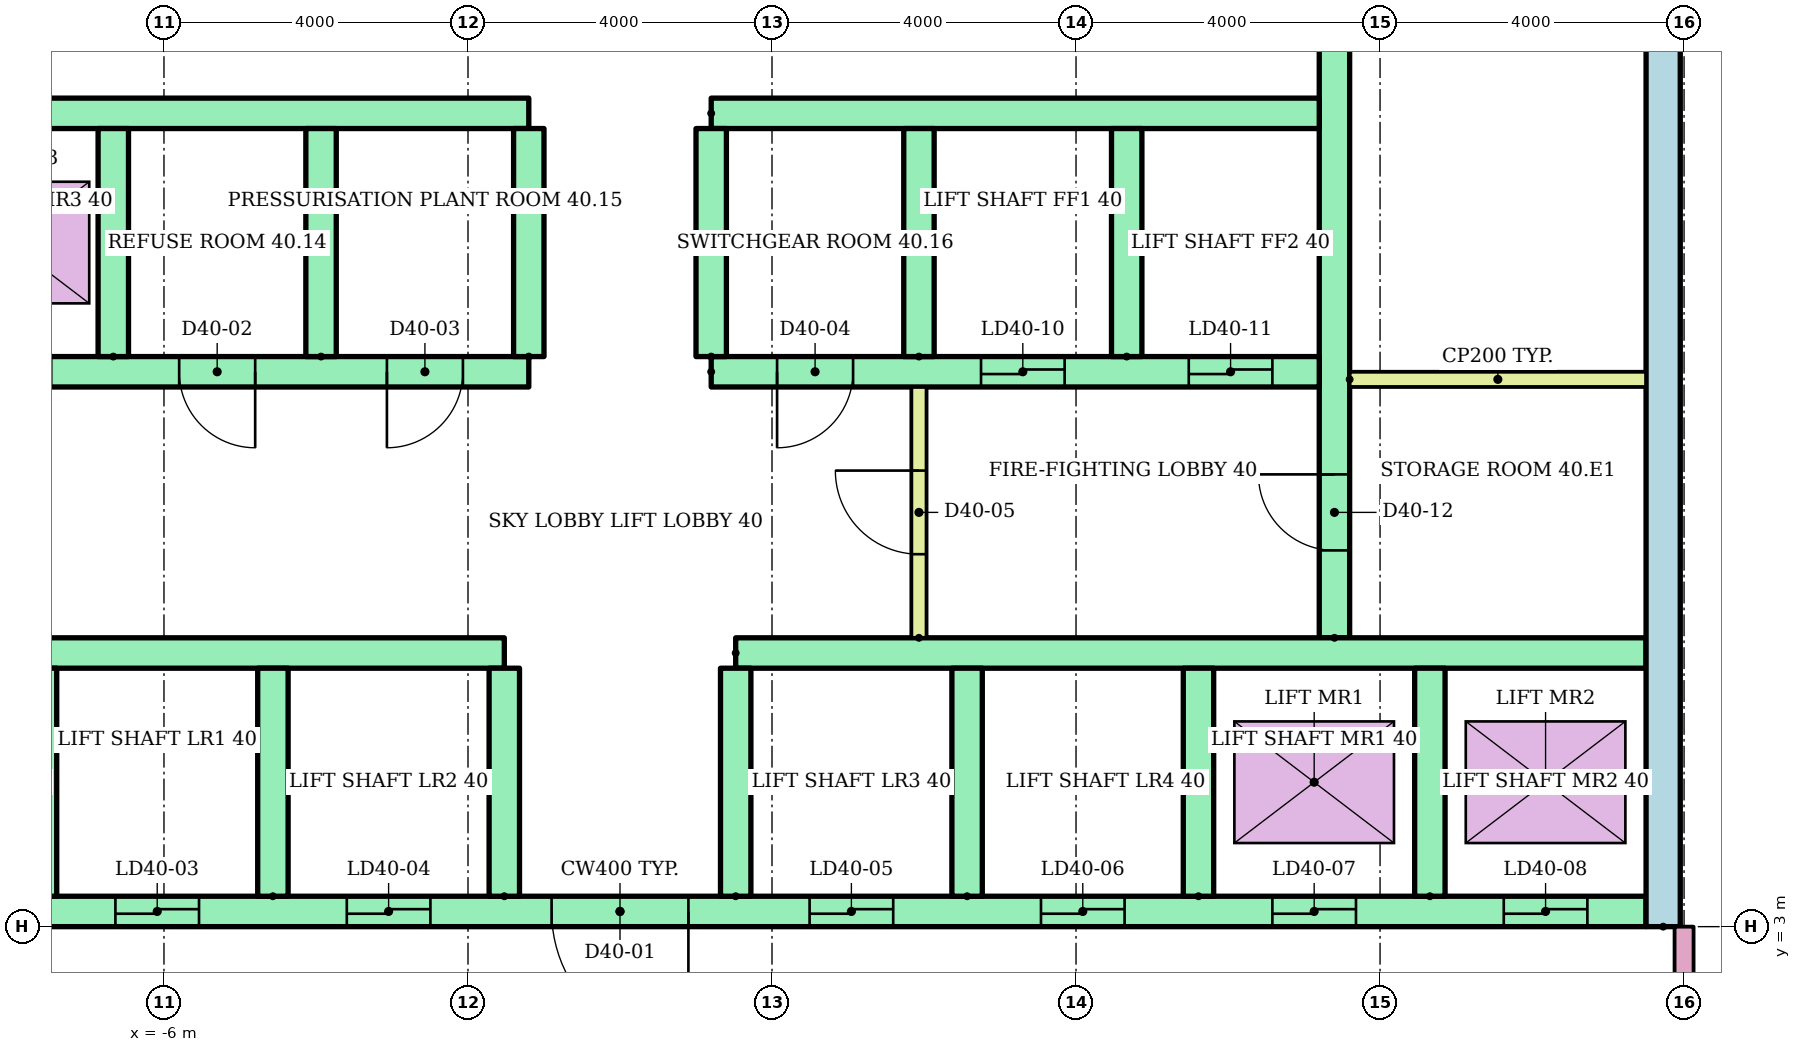
"""IFC4 building model, lengths in metres.
Left out: names, types, materials, properties, quantities, classifications, styles, units other than length and angle.
Written with IfcOpenShell. Run it as: python <this file> out.ifc"""

import sys

from ifc_helpers import new_model, si_unit, direction, frame, frame_2d, origin, place, context, subcontext, project, spatial, rectangle, extrude, element, fill, save


model = new_model("IFC4")
c1 = context("Model", 3, precision=1e-05, world=origin(), true_north=direction((0.0, 1.0)))
c2 = subcontext(c1, "Body", "Model", "MODEL_VIEW")
j1 = project(units=[si_unit("LENGTHUNIT", "METRE"), si_unit("PLANEANGLEUNIT", "RADIAN")], contexts=[c1])
p1 = place(None, origin())
s1 = spatial("IfcSite", under=j1, at=p1, CompositionType="ELEMENT")
p2 = place(p1, origin())
s2 = spatial("IfcBuilding", under=s1, at=p2, CompositionType="ELEMENT")
p3 = place(p2, frame((0.0, 0.0, 151.8)))
s3 = spatial("IfcBuildingStorey", under=s2, at=p3, CompositionType="ELEMENT", Elevation=151.8)
p4 = place(p3, frame((13.725, 3.0, 0.0), z_axis=(0.0, 0.0, 1.0), x_axis=(0.0, 1.0, 0.0)))
e1 = element("IfcWall", 1, at=p4, inside=s3, PredefinedType="SHEAR", context=c2, shape_type="SweptSolid", body=[
    extrude(rectangle(XDim=17.0, YDim=0.45, at=frame_2d((8.5, 0.0))), origin(), (0.0, 0.0, 1.0), 8.8),
])
p5 = place(p3, frame((9.4, 6.8, 0.0), z_axis=(0.0, 0.0, 1.0), x_axis=(0.0, 1.0, 0.0)))
e2 = element("IfcWall", 2, at=p5, inside=s3, PredefinedType="SHEAR", context=c2, shape_type="SweptSolid", body=[
    extrude(rectangle(XDim=12.7, YDim=0.4, at=frame_2d((6.35, 0.0))), origin(), (0.0, 0.0, 1.0), 8.8),
])
p6 = place(p5, frame((1.15, 0.0, 0.0)))
e3 = element("IfcOpeningElement", 3, at=p6, cuts=e2, PredefinedType="OPENING", context=c2, shape_type="SweptSolid", body=[
    extrude(rectangle(XDim=1.0, YDim=2.1, at=frame_2d((0.5, 1.05))), frame((0.0, 0.21, 0.0), z_axis=(0.0, -1.0, 0.0), x_axis=(1.0, 0.0, 0.0)), (0.0, 0.0, 1.0), 0.42),
])
p7 = place(p5, frame((7.925, 0.0, 0.0)))
e4 = element("IfcOpeningElement", 4, at=p7, cuts=e2, PredefinedType="OPENING", context=c2, shape_type="SweptSolid", body=[
    extrude(rectangle(XDim=1.0, YDim=2.1, at=frame_2d((0.5, 1.05))), frame((0.0, 0.21, 0.0), z_axis=(0.0, -1.0, 0.0), x_axis=(1.0, 0.0, 0.0)), (0.0, 0.0, 1.0), 0.42),
])
p8 = place(p3, frame((-13.5, 3.2, 0.0)))
e5 = element("IfcWall", 5, at=p8, inside=s3, PredefinedType="SHEAR", context=c2, shape_type="SweptSolid", body=[
    extrude(rectangle(XDim=27.0, YDim=0.4, at=frame_2d((13.5, 0.0))), origin(), (0.0, 0.0, 1.0), 8.8),
])
p9 = place(p8, frame((0.772, 0.0, 0.0)))
e6 = element("IfcOpeningElement", 6, at=p9, cuts=e5, PredefinedType="OPENING", context=c2, shape_type="SweptSolid", body=[
    extrude(rectangle(XDim=1.1, YDim=2.1, at=frame_2d((0.55, 1.05))), frame((0.0, 0.21, 0.0), z_axis=(0.0, -1.0, 0.0), x_axis=(1.0, 0.0, 0.0)), (0.0, 0.0, 1.0), 0.42),
])
p10 = place(p8, frame((3.817, 0.0, 0.0)))
e7 = element("IfcOpeningElement", 7, at=p10, cuts=e5, PredefinedType="OPENING", context=c2, shape_type="SweptSolid", body=[
    extrude(rectangle(XDim=1.1, YDim=2.1, at=frame_2d((0.55, 1.05))), frame((0.0, 0.21, 0.0), z_axis=(0.0, -1.0, 0.0), x_axis=(1.0, 0.0, 0.0)), (0.0, 0.0, 1.0), 0.42),
])
p11 = place(p8, frame((6.861, 0.0, 0.0)))
e8 = element("IfcOpeningElement", 8, at=p11, cuts=e5, PredefinedType="OPENING", context=c2, shape_type="SweptSolid", body=[
    extrude(rectangle(XDim=1.1, YDim=2.1, at=frame_2d((0.55, 1.05))), frame((0.0, 0.21, 0.0), z_axis=(0.0, -1.0, 0.0), x_axis=(1.0, 0.0, 0.0)), (0.0, 0.0, 1.0), 0.42),
])
p12 = place(p8, frame((9.906, 0.0, 0.0)))
e9 = element("IfcOpeningElement", 9, at=p12, cuts=e5, PredefinedType="OPENING", context=c2, shape_type="SweptSolid", body=[
    extrude(rectangle(XDim=1.1, YDim=2.1, at=frame_2d((0.55, 1.05))), frame((0.0, 0.21, 0.0), z_axis=(0.0, -1.0, 0.0), x_axis=(1.0, 0.0, 0.0)), (0.0, 0.0, 1.0), 0.42),
])
p13 = place(p8, frame((15.994, 0.0, 0.0)))
e10 = element("IfcOpeningElement", 10, at=p13, cuts=e5, PredefinedType="OPENING", context=c2, shape_type="SweptSolid", body=[
    extrude(rectangle(XDim=1.1, YDim=2.1, at=frame_2d((0.55, 1.05))), frame((0.0, 0.21, 0.0), z_axis=(0.0, -1.0, 0.0), x_axis=(1.0, 0.0, 0.0)), (0.0, 0.0, 1.0), 0.42),
])
p14 = place(p8, frame((19.039, 0.0, 0.0)))
e11 = element("IfcOpeningElement", 11, at=p14, cuts=e5, PredefinedType="OPENING", context=c2, shape_type="SweptSolid", body=[
    extrude(rectangle(XDim=1.1, YDim=2.1, at=frame_2d((0.55, 1.05))), frame((0.0, 0.21, 0.0), z_axis=(0.0, -1.0, 0.0), x_axis=(1.0, 0.0, 0.0)), (0.0, 0.0, 1.0), 0.42),
])
p15 = place(p8, frame((22.083, 0.0, 0.0)))
e12 = element("IfcOpeningElement", 12, at=p15, cuts=e5, PredefinedType="OPENING", context=c2, shape_type="SweptSolid", body=[
    extrude(rectangle(XDim=1.1, YDim=2.1, at=frame_2d((0.55, 1.05))), frame((0.0, 0.21, 0.0), z_axis=(0.0, -1.0, 0.0), x_axis=(1.0, 0.0, 0.0)), (0.0, 0.0, 1.0), 0.42),
])
p16 = place(p8, frame((25.128, 0.0, 0.0)))
e13 = element("IfcOpeningElement", 13, at=p16, cuts=e5, PredefinedType="OPENING", context=c2, shape_type="SweptSolid", body=[
    extrude(rectangle(XDim=1.1, YDim=2.1, at=frame_2d((0.55, 1.05))), frame((0.0, 0.21, 0.0), z_axis=(0.0, -1.0, 0.0), x_axis=(1.0, 0.0, 0.0)), (0.0, 0.0, 1.0), 0.42),
])
p17 = place(p8, frame((12.6, 0.0, 0.0)))
e14 = element("IfcOpeningElement", 14, at=p17, cuts=e5, PredefinedType="OPENING", context=c2, shape_type="SweptSolid", body=[
    extrude(rectangle(XDim=1.8, YDim=2.1, at=frame_2d((0.9, 1.05))), frame((0.0, 0.21, 0.0), z_axis=(0.0, -1.0, 0.0), x_axis=(1.0, 0.0, 0.0)), (0.0, 0.0, 1.0), 0.42),
])
for number, where in (
    (15, (-13.5, 6.6, 0.0)),
    (16, (1.522, 6.6, 0.0)),
):
    element("IfcWall", number, at=place(p3, frame(where)), inside=s3, PredefinedType="SHEAR", context=c2, shape_type="SweptSolid", body=[
        extrude(rectangle(XDim=11.978, YDim=0.4, at=frame_2d((5.989, 0.0))), origin(), (0.0, 0.0, 1.0), 8.8),
    ])
for number, where, z_axis, x_axis in (
    (17, (-7.611, 3.4, 0.0), (0.0, 0.0, 1.0), (0.0, 1.0, 0.0)),
    (18, (-4.567, 3.4, 0.0), (0.0, 0.0, 1.0), (0.0, 1.0, 0.0)),
    (19, (-1.522, 3.4, 0.0), (0.0, 0.0, 1.0), (0.0, 1.0, 0.0)),
    (20, (1.522, 3.4, 0.0), (0.0, 0.0, 1.0), (0.0, 1.0, 0.0)),
    (21, (4.567, 3.4, 0.0), (0.0, 0.0, 1.0), (0.0, 1.0, 0.0)),
    (22, (7.611, 3.4, 0.0), (0.0, 0.0, 1.0), (0.0, 1.0, 0.0)),
    (23, (10.656, 3.4, 0.0), (0.0, 0.0, 1.0), (0.0, 1.0, 0.0)),
):
    element("IfcWall", number, at=place(p3, frame(where, z_axis=z_axis, x_axis=x_axis)), inside=s3, PredefinedType="SHEAR", context=c2, shape_type="SweptSolid", body=[
        extrude(rectangle(XDim=3.0, YDim=0.4, at=frame_2d((1.5, 0.0))), origin(), (0.0, 0.0, 1.0), 8.8),
    ])
p18 = place(p3, frame((-9.2, 10.3, 0.0)))
e24 = element("IfcWall", 24, at=p18, inside=s3, PredefinedType="SHEAR", context=c2, shape_type="SweptSolid", body=[
    extrude(rectangle(XDim=8.0, YDim=0.4, at=frame_2d((4.0, 0.0))), origin(), (0.0, 0.0, 1.0), 8.8),
])
p19 = place(p18, frame((0.617, 0.0, 0.0)))
e25 = element("IfcOpeningElement", 25, at=p19, cuts=e24, PredefinedType="OPENING", context=c2, shape_type="SweptSolid", body=[
    extrude(rectangle(XDim=1.1, YDim=2.1, at=frame_2d((0.55, 1.05))), frame((0.0, 0.21, 0.0), z_axis=(0.0, -1.0, 0.0), x_axis=(1.0, 0.0, 0.0)), (0.0, 0.0, 1.0), 0.42),
])
p20 = place(p18, frame((3.4, 0.0, 0.0)))
e26 = element("IfcOpeningElement", 26, at=p20, cuts=e24, PredefinedType="OPENING", context=c2, shape_type="SweptSolid", body=[
    extrude(rectangle(XDim=1.0, YDim=2.1, at=frame_2d((0.5, 1.05))), frame((0.0, 0.21, 0.0), z_axis=(0.0, -1.0, 0.0), x_axis=(1.0, 0.0, 0.0)), (0.0, 0.0, 1.0), 0.42),
])
p21 = place(p18, frame((6.133, 0.0, 0.0)))
e27 = element("IfcOpeningElement", 27, at=p21, cuts=e24, PredefinedType="OPENING", context=c2, shape_type="SweptSolid", body=[
    extrude(rectangle(XDim=1.0, YDim=2.1, at=frame_2d((0.5, 1.05))), frame((0.0, 0.21, 0.0), z_axis=(0.0, -1.0, 0.0), x_axis=(1.0, 0.0, 0.0)), (0.0, 0.0, 1.0), 0.42),
])
p22 = place(p3, frame((-9.2, 13.7, 0.0)))
e28 = element("IfcWall", 28, at=p22, inside=s3, PredefinedType="SHEAR", context=c2, shape_type="SweptSolid", body=[
    extrude(rectangle(XDim=8.0, YDim=0.4, at=frame_2d((4.0, 0.0))), origin(), (0.0, 0.0, 1.0), 8.8),
])
p23 = place(p3, frame((1.2, 10.3, 0.0)))
e29 = element("IfcWall", 29, at=p23, inside=s3, PredefinedType="SHEAR", context=c2, shape_type="SweptSolid", body=[
    extrude(rectangle(XDim=8.0, YDim=0.4, at=frame_2d((4.0, 0.0))), origin(), (0.0, 0.0, 1.0), 8.8),
])
p24 = place(p23, frame((3.55, 0.0, 0.0)))
e30 = element("IfcOpeningElement", 30, at=p24, cuts=e29, PredefinedType="OPENING", context=c2, shape_type="SweptSolid", body=[
    extrude(rectangle(XDim=1.1, YDim=2.1, at=frame_2d((0.55, 1.05))), frame((0.0, 0.21, 0.0), z_axis=(0.0, -1.0, 0.0), x_axis=(1.0, 0.0, 0.0)), (0.0, 0.0, 1.0), 0.42),
])
p25 = place(p23, frame((6.283, 0.0, 0.0)))
e31 = element("IfcOpeningElement", 31, at=p25, cuts=e29, PredefinedType="OPENING", context=c2, shape_type="SweptSolid", body=[
    extrude(rectangle(XDim=1.1, YDim=2.1, at=frame_2d((0.55, 1.05))), frame((0.0, 0.21, 0.0), z_axis=(0.0, -1.0, 0.0), x_axis=(1.0, 0.0, 0.0)), (0.0, 0.0, 1.0), 0.42),
])
p26 = place(p23, frame((0.867, 0.0, 0.0)))
e32 = element("IfcOpeningElement", 32, at=p26, cuts=e29, PredefinedType="OPENING", context=c2, shape_type="SweptSolid", body=[
    extrude(rectangle(XDim=1.0, YDim=2.1, at=frame_2d((0.5, 1.05))), frame((0.0, 0.21, 0.0), z_axis=(0.0, -1.0, 0.0), x_axis=(1.0, 0.0, 0.0)), (0.0, 0.0, 1.0), 0.42),
])
p27 = place(p3, frame((1.2, 13.7, 0.0)))
e33 = element("IfcWall", 33, at=p27, inside=s3, PredefinedType="SHEAR", context=c2, shape_type="SweptSolid", body=[
    extrude(rectangle(XDim=8.0, YDim=0.4, at=frame_2d((4.0, 0.0))), origin(), (0.0, 0.0, 1.0), 8.8),
])
for number, where, z_axis, x_axis in (
    (34, (-6.667, 10.5, 0.0), (0.0, 0.0, 1.0), (0.0, 1.0, 0.0)),
    (35, (-3.933, 10.5, 0.0), (0.0, 0.0, 1.0), (0.0, 1.0, 0.0)),
    (36, (-1.2, 10.5, 0.0), (0.0, 0.0, 1.0), (0.0, 1.0, 0.0)),
    (37, (1.2, 10.5, 0.0), (0.0, 0.0, 1.0), (0.0, 1.0, 0.0)),
    (38, (3.933, 10.5, 0.0), (0.0, 0.0, 1.0), (0.0, 1.0, 0.0)),
    (39, (6.667, 10.5, 0.0), (0.0, 0.0, 1.0), (0.0, 1.0, 0.0)),
):
    element("IfcWall", number, at=place(p3, frame(where, z_axis=z_axis, x_axis=x_axis)), inside=s3, PredefinedType="SHEAR", context=c2, shape_type="SweptSolid", body=[
        extrude(rectangle(XDim=3.0, YDim=0.4, at=frame_2d((1.5, 0.0))), origin(), (0.0, 0.0, 1.0), 8.8),
    ])
p28 = place(p3, frame((3.933, 6.8, 0.0), z_axis=(0.0, 0.0, 1.0), x_axis=(0.0, 1.0, 0.0)))
e40 = element("IfcWall", 40, at=p28, inside=s3, PredefinedType="PARTITIONING", context=c2, shape_type="SweptSolid", body=[
    extrude(rectangle(XDim=3.3, YDim=0.2, at=frame_2d((1.65, 0.0))), origin(), (0.0, 0.0, 1.0), 8.8),
])
p29 = place(p28, frame((1.1, 0.0, 0.0)))
e41 = element("IfcOpeningElement", 41, at=p29, cuts=e40, PredefinedType="OPENING", context=c2, shape_type="SweptSolid", body=[
    extrude(rectangle(XDim=1.1, YDim=2.1, at=frame_2d((0.55, 1.05))), frame((0.0, 0.11, 0.0), z_axis=(0.0, -1.0, 0.0), x_axis=(1.0, 0.0, 0.0)), (0.0, 0.0, 1.0), 0.22),
])
p30 = place(p3, frame((9.6, 10.2, 0.0)))
e42 = element("IfcWall", 42, at=p30, inside=s3, PredefinedType="PARTITIONING", context=c2, shape_type="SweptSolid", body=[
    extrude(rectangle(XDim=3.9, YDim=0.2, at=frame_2d((1.95, 0.0))), origin(), (0.0, 0.0, 1.0), 8.8),
])
p31 = place(p3, frame((14.0, 1.4, 0.0), z_axis=(0.0, 0.0, 1.0), x_axis=(0.0, 1.0, 0.0)))
e43 = element("IfcWall", 43, at=p31, inside=s3, PredefinedType="PARTITIONING", context=c2, shape_type="SweptSolid", body=[
    extrude(rectangle(XDim=1.6, YDim=0.25, at=frame_2d((0.8, 0.0))), origin(), (0.0, 0.0, 1.0), 8.8),
])
p32 = place(p11, origin())
e44 = element("IfcDoor", 44, at=p32, inside=s3, OperationType="SLIDING_TO_LEFT", PredefinedType="DOOR", context=c2, shape_type="SweptSolid", body=[
    extrude(rectangle(XDim=1.1, YDim=2.1, at=frame_2d((0.55, 1.05))), frame((0.0, 0.025, 0.0), z_axis=(0.0, -1.0, 0.0), x_axis=(1.0, 0.0, 0.0)), (0.0, 0.0, 1.0), 0.05),
])
fill(e8, e44)
p33 = place(p12, origin())
e45 = element("IfcDoor", 45, at=p33, inside=s3, OperationType="SLIDING_TO_LEFT", PredefinedType="DOOR", context=c2, shape_type="SweptSolid", body=[
    extrude(rectangle(XDim=1.1, YDim=2.1, at=frame_2d((0.55, 1.05))), frame((0.0, 0.025, 0.0), z_axis=(0.0, -1.0, 0.0), x_axis=(1.0, 0.0, 0.0)), (0.0, 0.0, 1.0), 0.05),
])
fill(e9, e45)
p34 = place(p13, origin())
e46 = element("IfcDoor", 46, at=p34, inside=s3, OperationType="SLIDING_TO_LEFT", PredefinedType="DOOR", context=c2, shape_type="SweptSolid", body=[
    extrude(rectangle(XDim=1.1, YDim=2.1, at=frame_2d((0.55, 1.05))), frame((0.0, 0.025, 0.0), z_axis=(0.0, -1.0, 0.0), x_axis=(1.0, 0.0, 0.0)), (0.0, 0.0, 1.0), 0.05),
])
fill(e10, e46)
p35 = place(p14, origin())
e47 = element("IfcDoor", 47, at=p35, inside=s3, OperationType="SLIDING_TO_LEFT", PredefinedType="DOOR", context=c2, shape_type="SweptSolid", body=[
    extrude(rectangle(XDim=1.1, YDim=2.1, at=frame_2d((0.55, 1.05))), frame((0.0, 0.025, 0.0), z_axis=(0.0, -1.0, 0.0), x_axis=(1.0, 0.0, 0.0)), (0.0, 0.0, 1.0), 0.05),
])
fill(e11, e47)
p36 = place(p15, origin())
e48 = element("IfcDoor", 48, at=p36, inside=s3, OperationType="SLIDING_TO_LEFT", PredefinedType="DOOR", context=c2, shape_type="SweptSolid", body=[
    extrude(rectangle(XDim=1.1, YDim=2.1, at=frame_2d((0.55, 1.05))), frame((0.0, 0.025, 0.0), z_axis=(0.0, -1.0, 0.0), x_axis=(1.0, 0.0, 0.0)), (0.0, 0.0, 1.0), 0.05),
])
fill(e12, e48)
p37 = place(p16, origin())
e49 = element("IfcDoor", 49, at=p37, inside=s3, OperationType="SLIDING_TO_LEFT", PredefinedType="DOOR", context=c2, shape_type="SweptSolid", body=[
    extrude(rectangle(XDim=1.1, YDim=2.1, at=frame_2d((0.55, 1.05))), frame((0.0, 0.025, 0.0), z_axis=(0.0, -1.0, 0.0), x_axis=(1.0, 0.0, 0.0)), (0.0, 0.0, 1.0), 0.05),
])
fill(e13, e49)
p38 = place(p17, frame((1.8, 0.0, 0.0), z_axis=(0.0, 0.0, 1.0), x_axis=(-1.0, 0.0, 0.0)))
e50 = element("IfcDoor", 50, at=p38, inside=s3, OperationType="DOUBLE_DOOR_SINGLE_SWING", PredefinedType="DOOR", context=c2, shape_type="SweptSolid", body=[
    extrude(rectangle(XDim=1.8, YDim=2.1, at=frame_2d((0.9, 1.05))), frame((0.0, 0.025, 0.0), z_axis=(0.0, -1.0, 0.0), x_axis=(1.0, 0.0, 0.0)), (0.0, 0.0, 1.0), 0.05),
])
fill(e14, e50)
p39 = place(p24, origin())
e51 = element("IfcDoor", 51, at=p39, inside=s3, OperationType="SLIDING_TO_LEFT", PredefinedType="DOOR", context=c2, shape_type="SweptSolid", body=[
    extrude(rectangle(XDim=1.1, YDim=2.1, at=frame_2d((0.55, 1.05))), frame((0.0, 0.025, 0.0), z_axis=(0.0, -1.0, 0.0), x_axis=(1.0, 0.0, 0.0)), (0.0, 0.0, 1.0), 0.05),
])
fill(e30, e51)
p40 = place(p25, origin())
e52 = element("IfcDoor", 52, at=p40, inside=s3, OperationType="SLIDING_TO_LEFT", PredefinedType="DOOR", context=c2, shape_type="SweptSolid", body=[
    extrude(rectangle(XDim=1.1, YDim=2.1, at=frame_2d((0.55, 1.05))), frame((0.0, 0.025, 0.0), z_axis=(0.0, -1.0, 0.0), x_axis=(1.0, 0.0, 0.0)), (0.0, 0.0, 1.0), 0.05),
])
fill(e31, e52)
p41 = place(p20, frame((1.0, 0.0, 0.0), z_axis=(0.0, 0.0, 1.0), x_axis=(-1.0, 0.0, 0.0)))
e53 = element("IfcDoor", 53, at=p41, inside=s3, OperationType="SINGLE_SWING_RIGHT", PredefinedType="DOOR", context=c2, shape_type="SweptSolid", body=[
    extrude(rectangle(XDim=1.0, YDim=2.1, at=frame_2d((0.5, 1.05))), frame((0.0, 0.025, 0.0), z_axis=(0.0, -1.0, 0.0), x_axis=(1.0, 0.0, 0.0)), (0.0, 0.0, 1.0), 0.05),
])
fill(e26, e53)
p42 = place(p21, frame((1.0, 0.0, 0.0), z_axis=(0.0, 0.0, 1.0), x_axis=(-1.0, 0.0, 0.0)))
e54 = element("IfcDoor", 54, at=p42, inside=s3, OperationType="SINGLE_SWING_LEFT", PredefinedType="DOOR", context=c2, shape_type="SweptSolid", body=[
    extrude(rectangle(XDim=1.0, YDim=2.1, at=frame_2d((0.5, 1.05))), frame((0.0, 0.025, 0.0), z_axis=(0.0, -1.0, 0.0), x_axis=(1.0, 0.0, 0.0)), (0.0, 0.0, 1.0), 0.05),
])
fill(e27, e54)
p43 = place(p26, frame((1.0, 0.0, 0.0), z_axis=(0.0, 0.0, 1.0), x_axis=(-1.0, 0.0, 0.0)))
e55 = element("IfcDoor", 55, at=p43, inside=s3, OperationType="SINGLE_SWING_LEFT", PredefinedType="DOOR", context=c2, shape_type="SweptSolid", body=[
    extrude(rectangle(XDim=1.0, YDim=2.1, at=frame_2d((0.5, 1.05))), frame((0.0, 0.025, 0.0), z_axis=(0.0, -1.0, 0.0), x_axis=(1.0, 0.0, 0.0)), (0.0, 0.0, 1.0), 0.05),
])
fill(e32, e55)
p44 = place(p29, origin())
e56 = element("IfcDoor", 56, at=p44, inside=s3, OperationType="SINGLE_SWING_RIGHT", PredefinedType="DOOR", context=c2, shape_type="SweptSolid", body=[
    extrude(rectangle(XDim=1.1, YDim=2.1, at=frame_2d((0.55, 1.05))), frame((0.0, 0.025, 0.0), z_axis=(0.0, -1.0, 0.0), x_axis=(1.0, 0.0, 0.0)), (0.0, 0.0, 1.0), 0.05),
])
fill(e41, e56)
p45 = place(p6, origin())
e57 = element("IfcDoor", 57, at=p45, inside=s3, OperationType="SINGLE_SWING_RIGHT", PredefinedType="DOOR", context=c2, shape_type="SweptSolid", body=[
    extrude(rectangle(XDim=1.0, YDim=2.1, at=frame_2d((0.5, 1.05))), frame((0.0, 0.025, 0.0), z_axis=(0.0, -1.0, 0.0), x_axis=(1.0, 0.0, 0.0)), (0.0, 0.0, 1.0), 0.05),
])
fill(e3, e57)
save(model, sys.argv[1])
